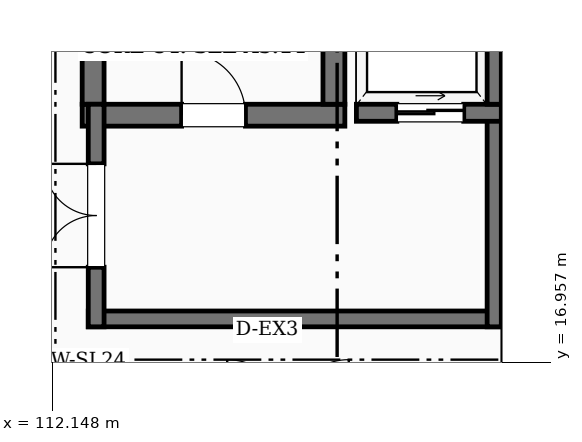
"""IFC4 building model, lengths in metres.
Left out: names, types, materials, properties, quantities, classifications, styles, units other than length and angle.
Written with IfcOpenShell. Run it as: python <this file> out.ifc"""

import sys

from ifc_helpers import new_model, si_unit, direction, frame, frame_2d, origin, place, context, subcontext, project, spatial, rectangle, extrude, element, fill, save


model = new_model("IFC4")
c1 = context("Model", 3, precision=1e-05, world=origin(), true_north=direction((0.0, 1.0)))
c2 = subcontext(c1, "Body", "Model", "MODEL_VIEW")
j1 = project(units=[si_unit("LENGTHUNIT", "METRE"), si_unit("PLANEANGLEUNIT", "RADIAN")], contexts=[c1])
p1 = place(None, origin())
s1 = spatial("IfcSite", under=j1, at=p1, CompositionType="ELEMENT")
p2 = place(p1, origin())
s2 = spatial("IfcBuilding", under=s1, at=p2, CompositionType="ELEMENT")
p3 = place(p2, origin())
s3 = spatial("IfcBuildingStorey", under=s2, at=p3, CompositionType="ELEMENT", Elevation=0.0)
p4 = place(p3, frame((112.64, 21.02, 0.0), z_axis=(0.0, 0.0, 1.0), x_axis=(1.0, 0.0, 0.0)))
e1 = element("IfcWall", 1, at=p4, inside=s3, PredefinedType="SHEAR", context=c2, shape_type="SweptSolid", body=[
    extrude(rectangle(XDim=4.32, YDim=0.36, at=frame_2d((2.16, 0.0))), origin(), (0.0, 0.0, 1.0), 5.4),
])
p5 = place(p4, frame((1.635, 0.0, 0.0)))
e2 = element("IfcOpeningElement", 2, at=p5, cuts=e1, PredefinedType="OPENING", context=c2, shape_type="SweptSolid", body=[
    extrude(rectangle(XDim=1.05, YDim=2.15, at=frame_2d((0.525, 1.075))), frame((0.0, 0.19, 0.0), z_axis=(0.0, -1.0, 0.0), x_axis=(1.0, 0.0, 0.0)), (0.0, 0.0, 1.0), 0.38),
])
for number, where, z_axis, x_axis in (
    (3, (112.82, 21.2, 0.0), (0.0, 0.0, 1.0), (0.0, 1.0, 0.0)),
    (4, (116.78, 21.2, 0.0), (0.0, 0.0, 1.0), (0.0, 1.0, 0.0)),
):
    element("IfcWall", number, at=place(p3, frame(where, z_axis=z_axis, x_axis=x_axis)), inside=s3, PredefinedType="SHEAR", context=c2, shape_type="SweptSolid", body=[
        extrude(rectangle(XDim=8.6, YDim=0.36, at=frame_2d((4.3, 0.0))), origin(), (0.0, 0.0, 1.0), 5.4),
    ])
p6 = place(p3, frame((119.56, 17.67, 0.0), z_axis=(0.0, 0.0, 1.0), x_axis=(-1.0, 0.0, 0.0)))
e5 = element("IfcWall", 5, at=p6, inside=s3, PredefinedType="SHEAR", context=c2, shape_type="SweptSolid", body=[
    extrude(rectangle(XDim=6.82, YDim=0.26, at=frame_2d((3.41, 0.0))), origin(), (0.0, 0.0, 1.0), 5.4),
])
p7 = place(p3, frame((112.87, 17.54, 0.0), z_axis=(0.0, 0.0, 1.0), x_axis=(0.0, 1.0, 0.0)))
e6 = element("IfcWall", 6, at=p7, inside=s3, PredefinedType="SHEAR", context=c2, shape_type="SweptSolid", body=[
    extrude(rectangle(XDim=3.66, YDim=0.26, at=frame_2d((1.83, 0.0))), origin(), (0.0, 0.0, 1.0), 5.4),
])
p8 = place(p7, frame((0.98, 0.0, 0.0)))
e7 = element("IfcOpeningElement", 7, at=p8, cuts=e6, PredefinedType="OPENING", context=c2, shape_type="SweptSolid", body=[
    extrude(rectangle(XDim=1.7, YDim=2.2, at=frame_2d((0.85, 1.1))), frame((0.0, 0.14, 0.0), z_axis=(0.0, -1.0, 0.0), x_axis=(1.0, 0.0, 0.0)), (0.0, 0.0, 1.0), 0.28),
])
p9 = place(p3, frame((119.43, 17.54, 0.0), z_axis=(0.0, 0.0, 1.0), x_axis=(0.0, 1.0, 0.0)))
e8 = element("IfcWall", 8, at=p9, inside=s3, PredefinedType="SHEAR", context=c2, shape_type="SweptSolid", body=[
    extrude(rectangle(XDim=3.66, YDim=0.26, at=frame_2d((1.83, 0.0))), origin(), (0.0, 0.0, 1.0), 5.4),
])
p10 = place(p3, frame((117.15, 21.06, 0.0), z_axis=(0.0, 0.0, 1.0), x_axis=(1.0, 0.0, 0.0)))
e9 = element("IfcWall", 9, at=p10, inside=s3, PredefinedType="SHEAR", context=c2, shape_type="SweptSolid", body=[
    extrude(rectangle(XDim=2.43, YDim=0.28, at=frame_2d((1.215, 0.0))), origin(), (0.0, 0.0, 1.0), 5.4),
])
p11 = place(p10, frame((0.665, 0.0, 0.0)))
e10 = element("IfcOpeningElement", 10, at=p11, cuts=e9, PredefinedType="OPENING", context=c2, shape_type="SweptSolid", body=[
    extrude(rectangle(XDim=1.1, YDim=2.15, at=frame_2d((0.55, 1.075))), frame((0.0, 0.15, 0.0), z_axis=(0.0, -1.0, 0.0), x_axis=(1.0, 0.0, 0.0)), (0.0, 0.0, 1.0), 0.3),
])
p12 = place(p3, frame((119.44, 21.2, 0.0), z_axis=(0.0, 0.0, 1.0), x_axis=(0.0, 1.0, 0.0)))
e11 = element("IfcWall", 11, at=p12, inside=s3, PredefinedType="SHEAR", context=c2, shape_type="SweptSolid", body=[
    extrude(rectangle(XDim=2.8, YDim=0.28, at=frame_2d((1.4, 0.0))), origin(), (0.0, 0.0, 1.0), 5.4),
])
p13 = place(p5, origin())
e12 = element("IfcDoor", 12, at=p13, inside=s3, OperationType="SINGLE_SWING_LEFT", PredefinedType="DOOR", context=c2, shape_type="SweptSolid", body=[
    extrude(rectangle(XDim=1.05, YDim=2.15, at=frame_2d((0.525, 1.075))), frame((0.0, 0.025, 0.0), z_axis=(0.0, -1.0, 0.0), x_axis=(1.0, 0.0, 0.0)), (0.0, 0.0, 1.0), 0.05),
])
fill(e2, e12)
p14 = place(p8, origin())
e13 = element("IfcDoor", 13, at=p14, inside=s3, OperationType="DOUBLE_DOOR_SINGLE_SWING", PredefinedType="DOOR", context=c2, shape_type="SweptSolid", body=[
    extrude(rectangle(XDim=1.7, YDim=2.2, at=frame_2d((0.85, 1.1))), frame((0.0, 0.025, 0.0), z_axis=(0.0, -1.0, 0.0), x_axis=(1.0, 0.0, 0.0)), (0.0, 0.0, 1.0), 0.05),
])
fill(e7, e13)
p15 = place(p11, origin())
e14 = element("IfcDoor", 14, at=p15, inside=s3, OperationType="SLIDING_TO_LEFT", PredefinedType="DOOR", context=c2, shape_type="SweptSolid", body=[
    extrude(rectangle(XDim=1.1, YDim=2.15, at=frame_2d((0.55, 1.075))), frame((0.0, 0.025, 0.0), z_axis=(0.0, -1.0, 0.0), x_axis=(1.0, 0.0, 0.0)), (0.0, 0.0, 1.0), 0.05),
])
fill(e10, e14)
save(model, sys.argv[1])
